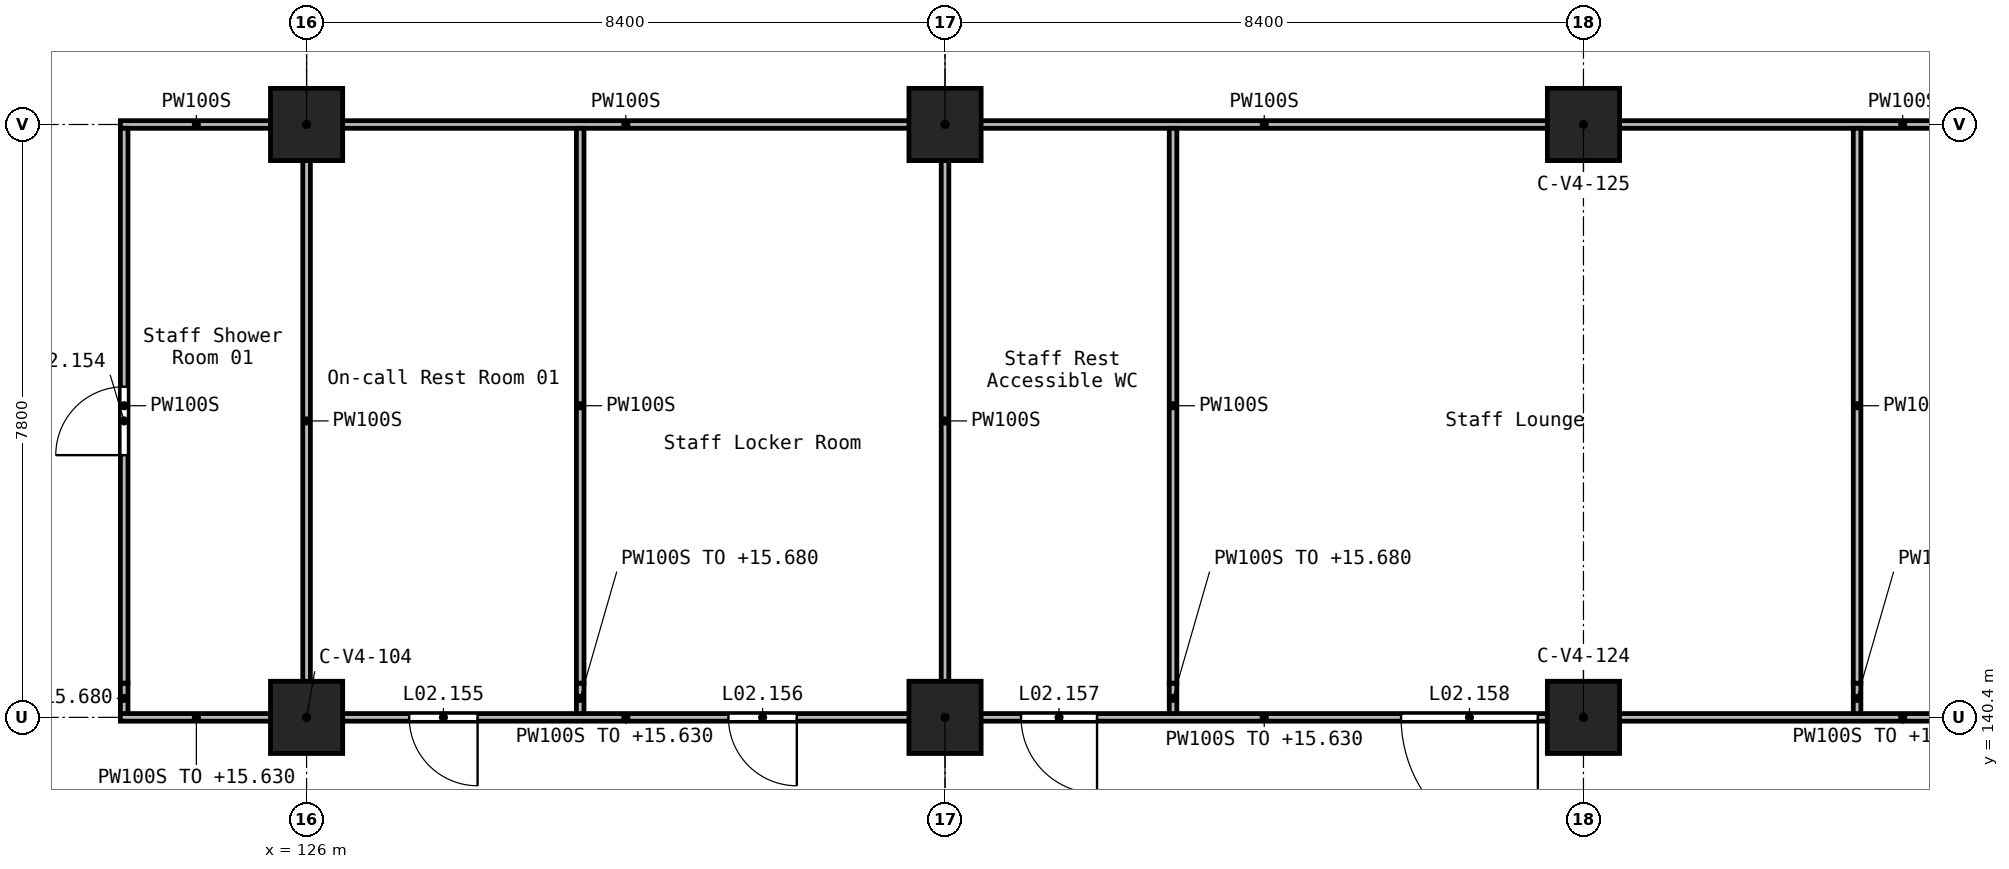
"""IFC4 building model, lengths in metres.
Left out: names, types, materials, properties, quantities, classifications, styles, units other than length and angle.
Written with IfcOpenShell. Run it as: python <this file> out.ifc"""

import sys

from ifc_helpers import new_model, si_unit, direction, frame, frame_2d, origin, origin_2d, place, context, subcontext, project, spatial, rectangle, extrude, element, fill, save


model = new_model("IFC4")
c1 = context("Model", 3, precision=1e-05, world=origin(), true_north=direction((0.0, 1.0)))
c2 = subcontext(c1, "Body", "Model", "MODEL_VIEW")
j1 = project(units=[si_unit("LENGTHUNIT", "METRE"), si_unit("PLANEANGLEUNIT", "RADIAN")], contexts=[c1])
p1 = place(None, origin())
s1 = spatial("IfcSite", under=j1, at=p1, CompositionType="ELEMENT")
p2 = place(p1, origin())
s2 = spatial("IfcBuilding", under=s1, at=p2, CompositionType="ELEMENT")
p3 = place(p2, frame((0.0, 0.0, 12.6)))
s3 = spatial("IfcBuildingStorey", under=s2, at=p3, CompositionType="ELEMENT", Elevation=12.6)
for number, where, z_axis, x_axis in (
    (1, (126.0, 140.4, 0.0), (0.0, 0.0, 1.0), (1.0, 0.0, 0.0)),
    (2, (126.0, 148.2, 0.0), (0.0, 0.0, 1.0), (1.0, 0.0, 0.0)),
    (3, (134.4, 140.4, 0.0), (0.0, 0.0, 1.0), (1.0, 0.0, 0.0)),
    (4, (134.4, 148.2, 0.0), (0.0, 0.0, 1.0), (1.0, 0.0, 0.0)),
    (5, (142.8, 140.4, 0.0), (0.0, 0.0, 1.0), (1.0, 0.0, 0.0)),
    (6, (142.8, 148.2, 0.0), (0.0, 0.0, 1.0), (1.0, 0.0, 0.0)),
):
    element("IfcColumn", number, at=place(p3, frame(where, z_axis=z_axis, x_axis=x_axis)), inside=s3, PredefinedType="COLUMN", context=c2, shape_type="SweptSolid", body=[
        extrude(rectangle(XDim=0.95, YDim=0.95, at=origin_2d()), origin(), (0.0, 0.0, 1.0), 4.2),
    ])
p4 = place(p3, frame((150.75, 140.4, 0.0), z_axis=(0.0, 0.0, 1.0), x_axis=(-1.0, 0.0, 0.0)))
e7 = element("IfcWall", 7, at=p4, inside=s3, PredefinedType="PARTITIONING", context=c2, shape_type="SweptSolid", body=[
    extrude(rectangle(XDim=7.5, YDim=0.1, at=frame_2d((3.75, 0.0))), origin(), (0.0, 0.0, 1.0), 3.03),
])
p5 = place(p4, frame((1.5, 0.0, 0.0)))
e8 = element("IfcOpeningElement", 8, at=p5, cuts=e7, PredefinedType="OPENING", context=c2, shape_type="SweptSolid", body=[
    extrude(rectangle(XDim=0.9, YDim=2.1, at=frame_2d((0.45, 1.05))), frame((0.0, 0.06, 0.0), z_axis=(0.0, -1.0, 0.0), x_axis=(1.0, 0.0, 0.0)), (0.0, 0.0, 1.0), 0.12),
])
p6 = place(p3, frame((142.35, 140.4, 0.0), z_axis=(0.0, 0.0, 1.0), x_axis=(-1.0, 0.0, 0.0)))
e9 = element("IfcWall", 9, at=p6, inside=s3, PredefinedType="PARTITIONING", context=c2, shape_type="SweptSolid", body=[
    extrude(rectangle(XDim=7.5, YDim=0.1, at=frame_2d((3.75, 0.0))), origin(), (0.0, 0.0, 1.0), 3.03),
])
p7 = place(p6, frame((5.95, 0.0, 0.0)))
e10 = element("IfcOpeningElement", 10, at=p7, cuts=e9, PredefinedType="OPENING", context=c2, shape_type="SweptSolid", body=[
    extrude(rectangle(XDim=1.0, YDim=2.1, at=frame_2d((0.5, 1.05))), frame((0.0, 0.06, 0.0), z_axis=(0.0, -1.0, 0.0), x_axis=(1.0, 0.0, 0.0)), (0.0, 0.0, 1.0), 0.12),
])
p8 = place(p6, frame((0.15, 0.0, 0.0)))
e11 = element("IfcOpeningElement", 11, at=p8, cuts=e9, PredefinedType="OPENING", context=c2, shape_type="SweptSolid", body=[
    extrude(rectangle(XDim=1.8, YDim=2.1, at=frame_2d((0.9, 1.05))), frame((0.0, 0.06, 0.0), z_axis=(0.0, -1.0, 0.0), x_axis=(1.0, 0.0, 0.0)), (0.0, 0.0, 1.0), 0.12),
])
p9 = place(p3, frame((133.95, 140.4, 0.0), z_axis=(0.0, 0.0, 1.0), x_axis=(-1.0, 0.0, 0.0)))
e12 = element("IfcWall", 12, at=p9, inside=s3, PredefinedType="PARTITIONING", context=c2, shape_type="SweptSolid", body=[
    extrude(rectangle(XDim=7.5, YDim=0.1, at=frame_2d((3.75, 0.0))), origin(), (0.0, 0.0, 1.0), 3.03),
])
p10 = place(p9, frame((5.7, 0.0, 0.0)))
e13 = element("IfcOpeningElement", 13, at=p10, cuts=e12, PredefinedType="OPENING", context=c2, shape_type="SweptSolid", body=[
    extrude(rectangle(XDim=0.9, YDim=2.1, at=frame_2d((0.45, 1.05))), frame((0.0, 0.06, 0.0), z_axis=(0.0, -1.0, 0.0), x_axis=(1.0, 0.0, 0.0)), (0.0, 0.0, 1.0), 0.12),
])
p11 = place(p9, frame((1.5, 0.0, 0.0)))
e14 = element("IfcOpeningElement", 14, at=p11, cuts=e12, PredefinedType="OPENING", context=c2, shape_type="SweptSolid", body=[
    extrude(rectangle(XDim=0.9, YDim=2.1, at=frame_2d((0.45, 1.05))), frame((0.0, 0.06, 0.0), z_axis=(0.0, -1.0, 0.0), x_axis=(1.0, 0.0, 0.0)), (0.0, 0.0, 1.0), 0.12),
])
p12 = place(p3, frame((125.55, 140.4, 0.0), z_axis=(0.0, 0.0, 1.0), x_axis=(-1.0, 0.0, 0.0)))
e15 = element("IfcWall", 15, at=p12, inside=s3, PredefinedType="PARTITIONING", context=c2, shape_type="SweptSolid", body=[
    extrude(rectangle(XDim=2.0, YDim=0.1, at=frame_2d((1.0, 0.0))), origin(), (0.0, 0.0, 1.0), 3.03),
])
for number, where, z_axis, x_axis in (
    (16, (150.75, 148.2, 0.0), (0.0, 0.0, 1.0), (-1.0, 0.0, 0.0)),
    (17, (142.35, 148.2, 0.0), (0.0, 0.0, 1.0), (-1.0, 0.0, 0.0)),
    (18, (133.95, 148.2, 0.0), (0.0, 0.0, 1.0), (-1.0, 0.0, 0.0)),
):
    element("IfcWall", number, at=place(p3, frame(where, z_axis=z_axis, x_axis=x_axis)), inside=s3, PredefinedType="PARTITIONING", context=c2, shape_type="SweptSolid", body=[
        extrude(rectangle(XDim=7.5, YDim=0.1, at=frame_2d((3.75, 0.0))), origin(), (0.0, 0.0, 1.0), 3.85),
    ])
p13 = place(p3, frame((125.55, 148.2, 0.0), z_axis=(0.0, 0.0, 1.0), x_axis=(-1.0, 0.0, 0.0)))
e19 = element("IfcWall", 19, at=p13, inside=s3, PredefinedType="PARTITIONING", context=c2, shape_type="SweptSolid", body=[
    extrude(rectangle(XDim=2.0, YDim=0.1, at=frame_2d((1.0, 0.0))), origin(), (0.0, 0.0, 1.0), 3.85),
])
p14 = place(p3, frame((123.6, 140.45, 0.0), z_axis=(0.0, 0.0, 1.0), x_axis=(0.0, 1.0, 0.0)))
e20 = element("IfcWall", 20, at=p14, inside=s3, PredefinedType="PARTITIONING", context=c2, shape_type="SweptSolid", body=[
    extrude(rectangle(XDim=0.4, YDim=0.1, at=frame_2d((0.2, 0.0))), origin(), (0.0, 0.0, 1.0), 3.08),
])
p15 = place(p3, frame((123.6, 140.85, 0.0), z_axis=(0.0, 0.0, 1.0), x_axis=(0.0, 1.0, 0.0)))
e21 = element("IfcWall", 21, at=p15, inside=s3, PredefinedType="PARTITIONING", context=c2, shape_type="SweptSolid", body=[
    extrude(rectangle(XDim=7.3, YDim=0.1, at=frame_2d((3.65, 0.0))), origin(), (0.0, 0.0, 1.0), 3.85),
])
p16 = place(p15, frame((3.0, 0.0, 0.0)))
e22 = element("IfcOpeningElement", 22, at=p16, cuts=e21, PredefinedType="OPENING", context=c2, shape_type="SweptSolid", body=[
    extrude(rectangle(XDim=0.9, YDim=2.1, at=frame_2d((0.45, 1.05))), frame((0.0, 0.06, 0.0), z_axis=(0.0, -1.0, 0.0), x_axis=(1.0, 0.0, 0.0)), (0.0, 0.0, 1.0), 0.12),
])
p17 = place(p3, frame((126.0, 140.85, 0.0), z_axis=(0.0, 0.0, 1.0), x_axis=(0.0, 1.0, 0.0)))
e23 = element("IfcWall", 23, at=p17, inside=s3, PredefinedType="PARTITIONING", context=c2, shape_type="SweptSolid", body=[
    extrude(rectangle(XDim=6.9, YDim=0.1, at=frame_2d((3.45, 0.0))), origin(), (0.0, 0.0, 1.0), 3.85),
])
p18 = place(p3, frame((129.6, 140.45, 0.0), z_axis=(0.0, 0.0, 1.0), x_axis=(0.0, 1.0, 0.0)))
e24 = element("IfcWall", 24, at=p18, inside=s3, PredefinedType="PARTITIONING", context=c2, shape_type="SweptSolid", body=[
    extrude(rectangle(XDim=0.4, YDim=0.1, at=frame_2d((0.2, 0.0))), origin(), (0.0, 0.0, 1.0), 3.08),
])
p19 = place(p3, frame((129.6, 140.85, 0.0), z_axis=(0.0, 0.0, 1.0), x_axis=(0.0, 1.0, 0.0)))
e25 = element("IfcWall", 25, at=p19, inside=s3, PredefinedType="PARTITIONING", context=c2, shape_type="SweptSolid", body=[
    extrude(rectangle(XDim=7.3, YDim=0.1, at=frame_2d((3.65, 0.0))), origin(), (0.0, 0.0, 1.0), 3.85),
])
p20 = place(p3, frame((134.4, 140.85, 0.0), z_axis=(0.0, 0.0, 1.0), x_axis=(0.0, 1.0, 0.0)))
e26 = element("IfcWall", 26, at=p20, inside=s3, PredefinedType="PARTITIONING", context=c2, shape_type="SweptSolid", body=[
    extrude(rectangle(XDim=6.9, YDim=0.1, at=frame_2d((3.45, 0.0))), origin(), (0.0, 0.0, 1.0), 3.85),
])
p21 = place(p3, frame((137.4, 140.45, 0.0), z_axis=(0.0, 0.0, 1.0), x_axis=(0.0, 1.0, 0.0)))
e27 = element("IfcWall", 27, at=p21, inside=s3, PredefinedType="PARTITIONING", context=c2, shape_type="SweptSolid", body=[
    extrude(rectangle(XDim=0.4, YDim=0.1, at=frame_2d((0.2, 0.0))), origin(), (0.0, 0.0, 1.0), 3.08),
])
p22 = place(p3, frame((137.4, 140.85, 0.0), z_axis=(0.0, 0.0, 1.0), x_axis=(0.0, 1.0, 0.0)))
e28 = element("IfcWall", 28, at=p22, inside=s3, PredefinedType="PARTITIONING", context=c2, shape_type="SweptSolid", body=[
    extrude(rectangle(XDim=7.3, YDim=0.1, at=frame_2d((3.65, 0.0))), origin(), (0.0, 0.0, 1.0), 3.85),
])
p23 = place(p3, frame((146.4, 140.45, 0.0), z_axis=(0.0, 0.0, 1.0), x_axis=(0.0, 1.0, 0.0)))
e29 = element("IfcWall", 29, at=p23, inside=s3, PredefinedType="PARTITIONING", context=c2, shape_type="SweptSolid", body=[
    extrude(rectangle(XDim=0.4, YDim=0.1, at=frame_2d((0.2, 0.0))), origin(), (0.0, 0.0, 1.0), 3.08),
])
p24 = place(p3, frame((146.4, 140.85, 0.0), z_axis=(0.0, 0.0, 1.0), x_axis=(0.0, 1.0, 0.0)))
e30 = element("IfcWall", 30, at=p24, inside=s3, PredefinedType="PARTITIONING", context=c2, shape_type="SweptSolid", body=[
    extrude(rectangle(XDim=7.3, YDim=0.1, at=frame_2d((3.65, 0.0))), origin(), (0.0, 0.0, 1.0), 3.85),
])
p25 = place(p16, frame((0.9, 0.0, 0.0), z_axis=(0.0, 0.0, 1.0), x_axis=(-1.0, 0.0, 0.0)))
e31 = element("IfcDoor", 31, at=p25, inside=s3, OperationType="SINGLE_SWING_RIGHT", PredefinedType="DOOR", context=c2, shape_type="SweptSolid", body=[
    extrude(rectangle(XDim=0.9, YDim=2.1, at=frame_2d((0.45, 1.05))), frame((0.0, 0.025, 0.0), z_axis=(0.0, -1.0, 0.0), x_axis=(1.0, 0.0, 0.0)), (0.0, 0.0, 1.0), 0.05),
])
fill(e22, e31)
p26 = place(p10, frame((0.9, 0.0, 0.0), z_axis=(0.0, 0.0, 1.0), x_axis=(-1.0, 0.0, 0.0)))
e32 = element("IfcDoor", 32, at=p26, inside=s3, OperationType="SINGLE_SWING_LEFT", PredefinedType="DOOR", context=c2, shape_type="SweptSolid", body=[
    extrude(rectangle(XDim=0.9, YDim=2.1, at=frame_2d((0.45, 1.05))), frame((0.0, 0.025, 0.0), z_axis=(0.0, -1.0, 0.0), x_axis=(1.0, 0.0, 0.0)), (0.0, 0.0, 1.0), 0.05),
])
fill(e13, e32)
p27 = place(p11, frame((0.9, 0.0, 0.0), z_axis=(0.0, 0.0, 1.0), x_axis=(-1.0, 0.0, 0.0)))
e33 = element("IfcDoor", 33, at=p27, inside=s3, OperationType="SINGLE_SWING_RIGHT", PredefinedType="DOOR", context=c2, shape_type="SweptSolid", body=[
    extrude(rectangle(XDim=0.9, YDim=2.1, at=frame_2d((0.45, 1.05))), frame((0.0, 0.025, 0.0), z_axis=(0.0, -1.0, 0.0), x_axis=(1.0, 0.0, 0.0)), (0.0, 0.0, 1.0), 0.05),
])
fill(e14, e33)
p28 = place(p7, frame((1.0, 0.0, 0.0), z_axis=(0.0, 0.0, 1.0), x_axis=(-1.0, 0.0, 0.0)))
e34 = element("IfcDoor", 34, at=p28, inside=s3, OperationType="SINGLE_SWING_LEFT", PredefinedType="DOOR", context=c2, shape_type="SweptSolid", body=[
    extrude(rectangle(XDim=1.0, YDim=2.1, at=frame_2d((0.5, 1.05))), frame((0.0, 0.025, 0.0), z_axis=(0.0, -1.0, 0.0), x_axis=(1.0, 0.0, 0.0)), (0.0, 0.0, 1.0), 0.05),
])
fill(e10, e34)
p29 = place(p8, frame((1.8, 0.0, 0.0), z_axis=(0.0, 0.0, 1.0), x_axis=(-1.0, 0.0, 0.0)))
e35 = element("IfcDoor", 35, at=p29, inside=s3, OperationType="DOUBLE_DOOR_SINGLE_SWING", PredefinedType="DOOR", context=c2, shape_type="SweptSolid", body=[
    extrude(rectangle(XDim=1.8, YDim=2.1, at=frame_2d((0.9, 1.05))), frame((0.0, 0.025, 0.0), z_axis=(0.0, -1.0, 0.0), x_axis=(1.0, 0.0, 0.0)), (0.0, 0.0, 1.0), 0.05),
])
fill(e11, e35)
save(model, sys.argv[1])
